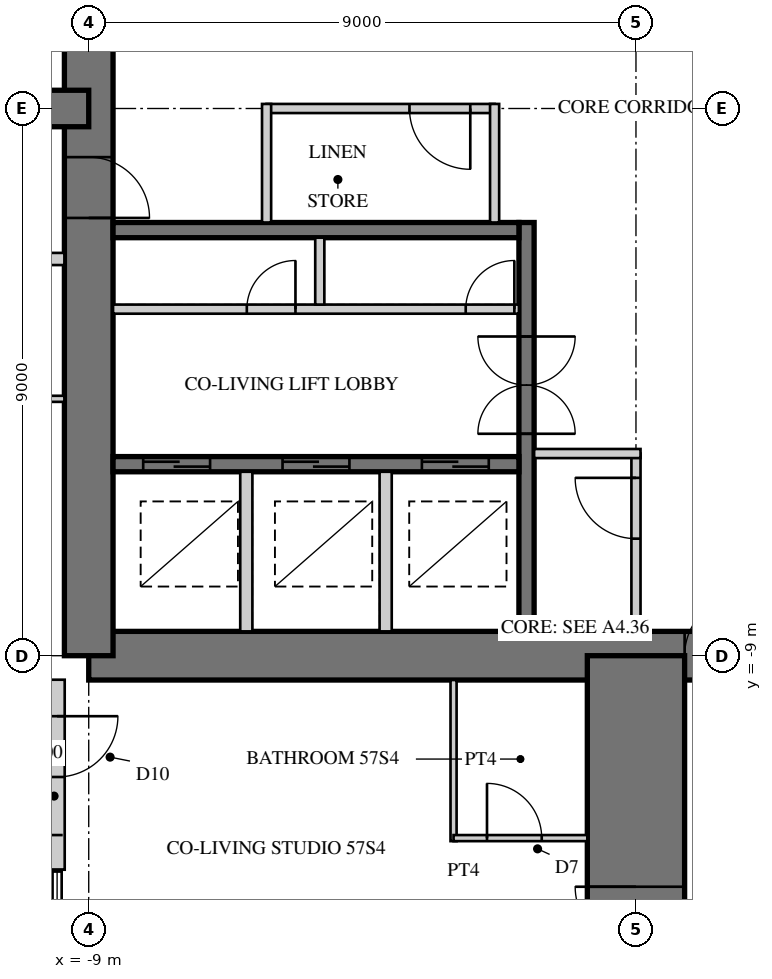
"""IFC4 building model, lengths in metres.
Left out: names, types, materials, properties, quantities, classifications, styles, units other than length and angle.
Written with IfcOpenShell. Run it as: python <this file> out.ifc"""

import sys

from ifc_helpers import new_model, si_unit, direction, frame, frame_2d, origin, place, context, subcontext, project, spatial, rectangle, hollow_rectangle, extrude, element, fill, save


model = new_model("IFC4")
c1 = context("Model", 3, precision=1e-05, world=origin(), true_north=direction((0.0, 1.0)))
c2 = subcontext(c1, "Body", "Model", "MODEL_VIEW")
j1 = project(units=[si_unit("LENGTHUNIT", "METRE"), si_unit("PLANEANGLEUNIT", "RADIAN")], contexts=[c1])
p1 = place(None, origin())
s1 = spatial("IfcSite", under=j1, at=p1, CompositionType="ELEMENT")
p2 = place(p1, origin())
s2 = spatial("IfcBuilding", under=s1, at=p2, CompositionType="ELEMENT")
p3 = place(p2, frame((0.0, 0.0, 225.5)))
s3 = spatial("IfcBuildingStorey", under=s2, at=p3, CompositionType="ELEMENT", Elevation=225.5)
p4 = place(p3, frame((-9.0, -9.0, 0.0), z_axis=(0.0, 0.0, 1.0), x_axis=(1.0, 0.0, 0.0)))
e1 = element("IfcWall", 1, at=p4, inside=s3, PredefinedType="SHEAR", context=c2, shape_type="SweptSolid", body=[
    extrude(rectangle(XDim=18.0, YDim=0.8, at=frame_2d((9.0, 0.0))), origin(), (0.0, 0.0, 1.0), 3.4),
])
p5 = place(p4, frame((9.8, 0.0, 0.0)))
e2 = element("IfcOpeningElement", 2, at=p5, cuts=e1, PredefinedType="OPENING", context=c2, shape_type="SweptSolid", body=[
    extrude(rectangle(XDim=1.0, YDim=2.4, at=frame_2d((0.5, 1.2))), frame((0.0, 0.41, 0.0), z_axis=(0.0, -1.0, 0.0), x_axis=(1.0, 0.0, 0.0)), (0.0, 0.0, 1.0), 0.82),
])
p6 = place(p3, frame((-9.0, 9.0, 0.0), z_axis=(0.0, 0.0, 1.0), x_axis=(0.0, -1.0, 0.0)))
e3 = element("IfcWall", 3, at=p6, inside=s3, PredefinedType="SHEAR", context=c2, shape_type="SweptSolid", body=[
    extrude(rectangle(XDim=18.0, YDim=0.8, at=frame_2d((9.0, 0.0))), origin(), (0.0, 0.0, 1.0), 3.4),
])
p7 = place(p6, frame((9.8, 0.0, 0.0)))
e4 = element("IfcOpeningElement", 4, at=p7, cuts=e3, PredefinedType="OPENING", context=c2, shape_type="SweptSolid", body=[
    extrude(rectangle(XDim=1.0, YDim=2.4, at=frame_2d((0.5, 1.2))), frame((0.0, 0.41, 0.0), z_axis=(0.0, -1.0, 0.0), x_axis=(1.0, 0.0, 0.0)), (0.0, 0.0, 1.0), 0.82),
])
p8 = place(p3, frame((-1.8, -1.875, 0.0), z_axis=(0.0, 0.0, 1.0), x_axis=(0.0, -1.0, 0.0)))
e5 = element("IfcWall", 5, at=p8, inside=s3, PredefinedType="SHEAR", context=c2, shape_type="SweptSolid", body=[
    extrude(rectangle(XDim=6.725, YDim=0.25, at=frame_2d((3.363, 0.0))), origin(), (0.0, 0.0, 1.0), 3.4),
])
p9 = place(p8, frame((1.875, 0.0, 0.0)))
e6 = element("IfcOpeningElement", 6, at=p9, cuts=e5, PredefinedType="OPENING", context=c2, shape_type="SweptSolid", body=[
    extrude(rectangle(XDim=1.6, YDim=2.4, at=frame_2d((0.8, 1.2))), frame((0.0, 0.135, 0.0), z_axis=(0.0, -1.0, 0.0), x_axis=(1.0, 0.0, 0.0)), (0.0, 0.0, 1.0), 0.27),
])
p10 = place(p3, frame((-1.925, -2.0, 0.0), z_axis=(0.0, 0.0, 1.0), x_axis=(-1.0, 0.0, 0.0)))
e7 = element("IfcWall", 7, at=p10, inside=s3, PredefinedType="SHEAR", context=c2, shape_type="SweptSolid", body=[
    extrude(rectangle(XDim=6.675, YDim=0.25, at=frame_2d((3.337, 0.0))), origin(), (0.0, 0.0, 1.0), 3.4),
])
p11 = place(p3, frame((-1.925, -5.85, 0.0), z_axis=(0.0, 0.0, 1.0), x_axis=(-1.0, 0.0, 0.0)))
e8 = element("IfcWall", 8, at=p11, inside=s3, PredefinedType="SHEAR", context=c2, shape_type="SweptSolid", body=[
    extrude(rectangle(XDim=6.675, YDim=0.25, at=frame_2d((3.337, 0.0))), origin(), (0.0, 0.0, 1.0), 3.4),
])
p12 = place(p11, frame((0.496, 0.0, 0.0)))
e9 = element("IfcOpeningElement", 9, at=p12, cuts=e8, PredefinedType="OPENING", context=c2, shape_type="SweptSolid", body=[
    extrude(rectangle(XDim=1.1, YDim=2.2, at=frame_2d((0.55, 1.1))), frame((0.0, 0.135, 0.0), z_axis=(0.0, -1.0, 0.0), x_axis=(1.0, 0.0, 0.0)), (0.0, 0.0, 1.0), 0.27),
])
p13 = place(p11, frame((2.788, 0.0, 0.0)))
e10 = element("IfcOpeningElement", 10, at=p13, cuts=e8, PredefinedType="OPENING", context=c2, shape_type="SweptSolid", body=[
    extrude(rectangle(XDim=1.1, YDim=2.2, at=frame_2d((0.55, 1.1))), frame((0.0, 0.135, 0.0), z_axis=(0.0, -1.0, 0.0), x_axis=(1.0, 0.0, 0.0)), (0.0, 0.0, 1.0), 0.27),
])
p14 = place(p11, frame((5.079, 0.0, 0.0)))
e11 = element("IfcOpeningElement", 11, at=p14, cuts=e8, PredefinedType="OPENING", context=c2, shape_type="SweptSolid", body=[
    extrude(rectangle(XDim=1.1, YDim=2.2, at=frame_2d((0.55, 1.1))), frame((0.0, 0.135, 0.0), z_axis=(0.0, -1.0, 0.0), x_axis=(1.0, 0.0, 0.0)), (0.0, 0.0, 1.0), 0.27),
])
p15 = place(p3, frame((-1.925, -3.3, 0.0), z_axis=(0.0, 0.0, 1.0), x_axis=(-1.0, 0.0, 0.0)))
e12 = element("IfcWall", 12, at=p15, inside=s3, PredefinedType="PARTITIONING", context=c2, shape_type="SweptSolid", body=[
    extrude(rectangle(XDim=6.675, YDim=0.15, at=frame_2d((3.337, 0.0))), origin(), (0.0, 0.0, 1.0), 3.4),
])
p16 = place(p15, frame((0.075, 0.0, 0.0)))
e13 = element("IfcOpeningElement", 13, at=p16, cuts=e12, PredefinedType="OPENING", context=c2, shape_type="SweptSolid", body=[
    extrude(rectangle(XDim=0.8, YDim=2.1, at=frame_2d((0.4, 1.05))), frame((0.0, 0.085, 0.0), z_axis=(0.0, -1.0, 0.0), x_axis=(1.0, 0.0, 0.0)), (0.0, 0.0, 1.0), 0.17),
])
p17 = place(p15, frame((3.675, 0.0, 0.0)))
e14 = element("IfcOpeningElement", 14, at=p17, cuts=e12, PredefinedType="OPENING", context=c2, shape_type="SweptSolid", body=[
    extrude(rectangle(XDim=0.8, YDim=2.1, at=frame_2d((0.4, 1.05))), frame((0.0, 0.085, 0.0), z_axis=(0.0, -1.0, 0.0), x_axis=(1.0, 0.0, 0.0)), (0.0, 0.0, 1.0), 0.17),
])
p18 = place(p3, frame((-5.2, -2.125, 0.0), z_axis=(0.0, 0.0, 1.0), x_axis=(0.0, -1.0, 0.0)))
e15 = element("IfcWall", 15, at=p18, inside=s3, PredefinedType="PARTITIONING", context=c2, shape_type="SweptSolid", body=[
    extrude(rectangle(XDim=1.1, YDim=0.15, at=frame_2d((0.55, 0.0))), origin(), (0.0, 0.0, 1.0), 3.4),
])
for number, where, z_axis, x_axis in (
    (16, (-4.117, -5.975, 0.0), (0.0, 0.0, 1.0), (0.0, -1.0, 0.0)),
    (17, (-6.408, -5.975, 0.0), (0.0, 0.0, 1.0), (0.0, -1.0, 0.0)),
):
    element("IfcWall", number, at=place(p3, frame(where, z_axis=z_axis, x_axis=x_axis)), inside=s3, PredefinedType="PARTITIONING", context=c2, shape_type="SweptSolid", body=[
        extrude(rectangle(XDim=2.625, YDim=0.2, at=frame_2d((1.312, 0.0))), origin(), (0.0, 0.0, 1.0), 3.4),
    ])
p19 = place(p3, frame((0.0, -9.0, 0.0), z_axis=(0.0, 0.0, 1.0), x_axis=(0.0, -1.0, 0.0)))
e18 = element("IfcWall", 18, at=p19, inside=s3, PredefinedType="SHEAR", context=c2, shape_type="SweptSolid", body=[
    extrude(rectangle(XDim=9.0, YDim=1.6, at=frame_2d((4.5, 0.0))), origin(), (0.0, 0.0, 1.0), 3.4),
])
p20 = place(p19, frame((3.8, 0.0, 0.0)))
e19 = element("IfcOpeningElement", 19, at=p20, cuts=e18, PredefinedType="OPENING", context=c2, shape_type="SweptSolid", body=[
    extrude(rectangle(XDim=1.0, YDim=2.15, at=frame_2d((0.5, 1.075))), frame((0.0, 0.81, 0.0), z_axis=(0.0, -1.0, 0.0), x_axis=(1.0, 0.0, 0.0)), (0.0, 0.0, 1.0), 1.62),
])
p21 = place(p19, frame((7.0, 0.0, 0.0)))
e20 = element("IfcOpeningElement", 20, at=p21, cuts=e18, PredefinedType="OPENING", context=c2, shape_type="SweptSolid", body=[
    extrude(rectangle(XDim=1.0, YDim=2.2, at=frame_2d((0.5, 1.1))), frame((0.0, 0.81, 0.0), z_axis=(0.0, -1.0, 0.0), x_axis=(1.0, 0.0, 0.0)), (0.0, 0.0, 1.0), 1.62),
])
p22 = place(p3, frame((-9.0, 0.0, 0.0), z_axis=(0.0, 0.0, 1.0), x_axis=(-1.0, 0.0, 0.0)))
e21 = element("IfcWall", 21, at=p22, inside=s3, PredefinedType="SHEAR", context=c2, shape_type="SweptSolid", body=[
    extrude(rectangle(XDim=18.0, YDim=0.6, at=frame_2d((9.0, 0.0))), origin(), (0.0, 0.0, 1.0), 3.4),
])
p23 = place(p22, frame((3.8, 0.0, 0.0)))
e22 = element("IfcOpeningElement", 22, at=p23, cuts=e21, PredefinedType="OPENING", context=c2, shape_type="SweptSolid", body=[
    extrude(rectangle(XDim=1.0, YDim=2.15, at=frame_2d((0.5, 1.075))), frame((0.0, 0.31, 0.0), z_axis=(0.0, -1.0, 0.0), x_axis=(1.0, 0.0, 0.0)), (0.0, 0.0, 1.0), 0.62),
])
p24 = place(p22, frame((6.6, 0.0, 0.0)))
e23 = element("IfcOpeningElement", 23, at=p24, cuts=e21, PredefinedType="OPENING", context=c2, shape_type="SweptSolid", body=[
    extrude(rectangle(XDim=1.0, YDim=2.15, at=frame_2d((0.5, 1.075))), frame((0.0, 0.31, 0.0), z_axis=(0.0, -1.0, 0.0), x_axis=(1.0, 0.0, 0.0)), (0.0, 0.0, 1.0), 0.62),
])
p25 = place(p22, frame((13.3, 0.0, 0.0)))
e24 = element("IfcOpeningElement", 24, at=p25, cuts=e21, PredefinedType="OPENING", context=c2, shape_type="SweptSolid", body=[
    extrude(rectangle(XDim=1.0, YDim=2.2, at=frame_2d((0.5, 1.1))), frame((0.0, 0.31, 0.0), z_axis=(0.0, -1.0, 0.0), x_axis=(1.0, 0.0, 0.0)), (0.0, 0.0, 1.0), 0.62),
])
p26 = place(p3, frame((-9.52, -9.395, 0.0), z_axis=(0.0, 0.0, 1.0), x_axis=(0.0, -1.0, 0.0)))
e25 = element("IfcWall", 25, at=p26, inside=s3, PredefinedType="SOLIDWALL", context=c2, shape_type="SweptSolid", body=[
    extrude(rectangle(XDim=3.125, YDim=0.25, at=frame_2d((1.562, 0.0))), origin(), (0.0, 0.0, 1.0), 3.22),
])
p27 = place(p26, frame((0.6, 0.0, 0.0)))
e26 = element("IfcOpeningElement", 26, at=p27, cuts=e25, PredefinedType="OPENING", context=c2, shape_type="SweptSolid", body=[
    extrude(rectangle(XDim=1.0, YDim=2.2, at=frame_2d((0.5, 1.1))), frame((0.0, 0.135, 0.0), z_axis=(0.0, -1.0, 0.0), x_axis=(1.0, 0.0, 0.0)), (0.0, 0.0, 1.0), 0.27),
])
p28 = place(p3, frame((-2.325, 0.0, 0.0), z_axis=(0.0, 0.0, 1.0), x_axis=(-1.0, 0.0, 0.0)))
e27 = element("IfcWall", 27, at=p28, inside=s3, PredefinedType="PARTITIONING", context=c2, shape_type="SweptSolid", body=[
    extrude(rectangle(XDim=3.75, YDim=0.15, at=frame_2d((1.875, 0.0))), origin(), (0.0, 0.0, 1.0), 3.22),
])
p29 = place(p28, frame((0.4, 0.0, 0.0)))
e28 = element("IfcOpeningElement", 28, at=p29, cuts=e27, PredefinedType="OPENING", context=c2, shape_type="SweptSolid", body=[
    extrude(rectangle(XDim=1.0, YDim=2.1, at=frame_2d((0.5, 1.05))), frame((0.0, 0.085, 0.0), z_axis=(0.0, -1.0, 0.0), x_axis=(1.0, 0.0, 0.0)), (0.0, 0.0, 1.0), 0.17),
])
for number, where, z_axis, x_axis in (
    (29, (-2.325, -1.875, 0.0), (0.0, 0.0, 1.0), (0.0, 1.0, 0.0)),
    (30, (-6.075, 0.075, 0.0), (0.0, 0.0, 1.0), (0.0, -1.0, 0.0)),
):
    element("IfcWall", number, at=place(p3, frame(where, z_axis=z_axis, x_axis=x_axis)), inside=s3, PredefinedType="PARTITIONING", context=c2, shape_type="SweptSolid", body=[
        extrude(rectangle(XDim=1.95, YDim=0.15, at=frame_2d((0.975, 0.0))), origin(), (0.0, 0.0, 1.0), 3.22),
    ])
p30 = place(p3, frame((0.0, -5.675, 0.0), z_axis=(0.0, 0.0, 1.0), x_axis=(0.0, -1.0, 0.0)))
e31 = element("IfcWall", 31, at=p30, inside=s3, PredefinedType="PARTITIONING", context=c2, shape_type="SweptSolid", body=[
    extrude(rectangle(XDim=2.925, YDim=0.15, at=frame_2d((1.462, 0.0))), origin(), (0.0, 0.0, 1.0), 3.22),
])
p31 = place(p30, frame((0.4, 0.0, 0.0)))
e32 = element("IfcOpeningElement", 32, at=p31, cuts=e31, PredefinedType="OPENING", context=c2, shape_type="SweptSolid", body=[
    extrude(rectangle(XDim=1.0, YDim=2.1, at=frame_2d((0.5, 1.05))), frame((0.0, 0.085, 0.0), z_axis=(0.0, -1.0, 0.0), x_axis=(1.0, 0.0, 0.0)), (0.0, 0.0, 1.0), 0.17),
])
p32 = place(p3, frame((-1.675, -5.675, 0.0), z_axis=(0.0, 0.0, 1.0), x_axis=(1.0, 0.0, 0.0)))
e33 = element("IfcWall", 33, at=p32, inside=s3, PredefinedType="PARTITIONING", context=c2, shape_type="SweptSolid", body=[
    extrude(rectangle(XDim=1.75, YDim=0.15, at=frame_2d((0.875, 0.0))), origin(), (0.0, 0.0, 1.0), 3.22),
])
p33 = place(p3, frame((-3.0, -9.4, 0.0), z_axis=(0.0, 0.0, 1.0), x_axis=(0.0, -1.0, 0.0)))
e34 = element("IfcWall", 34, at=p33, inside=s3, PredefinedType="PARTITIONING", context=c2, shape_type="SweptSolid", body=[
    extrude(rectangle(XDim=2.65, YDim=0.1, at=frame_2d((1.325, 0.0))), origin(), (0.0, 0.0, 1.0), 3.22),
])
p34 = place(p3, frame((-3.0, -12.0, 0.0), z_axis=(0.0, 0.0, 1.0), x_axis=(1.0, 0.0, 0.0)))
e35 = element("IfcWall", 35, at=p34, inside=s3, PredefinedType="PARTITIONING", context=c2, shape_type="SweptSolid", body=[
    extrude(rectangle(XDim=2.2, YDim=0.1, at=frame_2d((1.1, 0.0))), origin(), (0.0, 0.0, 1.0), 3.22),
])
p35 = place(p34, frame((0.55, 0.0, 0.0)))
e36 = element("IfcOpeningElement", 36, at=p35, cuts=e35, PredefinedType="OPENING", context=c2, shape_type="SweptSolid", body=[
    extrude(rectangle(XDim=0.9, YDim=2.1, at=frame_2d((0.45, 1.05))), frame((0.0, 0.06, 0.0), z_axis=(0.0, -1.0, 0.0), x_axis=(1.0, 0.0, 0.0)), (0.0, 0.0, 1.0), 0.12),
])
p36 = place(p3, frame((-9.4, -4.775, 0.0), z_axis=(0.0, 0.0, 1.0), x_axis=(-1.0, 0.0, 0.0)))
e37 = element("IfcWall", 37, at=p36, inside=s3, PredefinedType="PARTITIONING", context=c2, shape_type="SweptSolid", body=[
    extrude(rectangle(XDim=2.65, YDim=0.1, at=frame_2d((1.325, 0.0))), origin(), (0.0, 0.0, 1.0), 3.22),
])
p37 = place(p3, frame((-9.4, -2.475, 0.0), z_axis=(0.0, 0.0, 1.0), x_axis=(-1.0, 0.0, 0.0)))
e38 = element("IfcWall", 38, at=p37, inside=s3, PredefinedType="SOLIDWALL", context=c2, shape_type="SweptSolid", body=[
    extrude(rectangle(XDim=11.6, YDim=0.2, at=frame_2d((5.8, 0.0))), origin(), (0.0, 0.0, 1.0), 3.22),
])
p38 = place(p37, frame((3.4, 0.0, 0.0)))
e39 = element("IfcOpeningElement", 39, at=p38, cuts=e38, PredefinedType="OPENING", context=c2, shape_type="SweptSolid", body=[
    extrude(rectangle(XDim=1.0, YDim=2.15, at=frame_2d((0.5, 1.075))), frame((0.0, 0.11, 0.0), z_axis=(0.0, -1.0, 0.0), x_axis=(1.0, 0.0, 0.0)), (0.0, 0.0, 1.0), 0.22),
])
p39 = place(p37, frame((6.2, 0.0, 0.0)))
e40 = element("IfcOpeningElement", 40, at=p39, cuts=e38, PredefinedType="OPENING", context=c2, shape_type="SweptSolid", body=[
    extrude(rectangle(XDim=1.0, YDim=2.15, at=frame_2d((0.5, 1.075))), frame((0.0, 0.11, 0.0), z_axis=(0.0, -1.0, 0.0), x_axis=(1.0, 0.0, 0.0)), (0.0, 0.0, 1.0), 0.22),
])
p40 = place(p27, origin())
e41 = element("IfcDoor", 41, at=p40, inside=s3, OperationType="SINGLE_SWING_LEFT", PredefinedType="DOOR", context=c2, shape_type="SweptSolid", body=[
    extrude(hollow_rectangle(XDim=1.0, YDim=2.2, WallThickness=0.06, at=frame_2d((0.5, 1.1))), frame((0.0, 0.025, 0.0), z_axis=(0.0, -1.0, 0.0), x_axis=(1.0, 0.0, 0.0)), (0.0, 0.0, 1.0), 0.05),
    extrude(rectangle(XDim=0.879, YDim=2.079, at=frame_2d((0.5, 1.1))), frame((0.0, 0.025, 0.0), z_axis=(0.0, -1.0, 0.0), x_axis=(1.0, 0.0, 0.0)), (0.0, 0.0, 1.0), 0.05),
])
fill(e26, e41)
p41 = place(p29, origin())
e42 = element("IfcDoor", 42, at=p41, inside=s3, OperationType="SINGLE_SWING_LEFT", PredefinedType="DOOR", context=c2, shape_type="SweptSolid", body=[
    extrude(rectangle(XDim=1.0, YDim=2.1, at=frame_2d((0.5, 1.05))), frame((0.0, 0.025, 0.0), z_axis=(0.0, -1.0, 0.0), x_axis=(1.0, 0.0, 0.0)), (0.0, 0.0, 1.0), 0.05),
])
fill(e28, e42)
p42 = place(p31, frame((1.0, 0.0, 0.0), z_axis=(0.0, 0.0, 1.0), x_axis=(-1.0, 0.0, 0.0)))
e43 = element("IfcDoor", 43, at=p42, inside=s3, OperationType="SINGLE_SWING_RIGHT", PredefinedType="DOOR", context=c2, shape_type="SweptSolid", body=[
    extrude(rectangle(XDim=1.0, YDim=2.1, at=frame_2d((0.5, 1.05))), frame((0.0, 0.025, 0.0), z_axis=(0.0, -1.0, 0.0), x_axis=(1.0, 0.0, 0.0)), (0.0, 0.0, 1.0), 0.05),
])
fill(e32, e43)
p43 = place(p35, origin())
e44 = element("IfcDoor", 44, at=p43, inside=s3, OperationType="SINGLE_SWING_LEFT", PredefinedType="DOOR", context=c2, shape_type="SweptSolid", body=[
    extrude(rectangle(XDim=0.9, YDim=2.1, at=frame_2d((0.45, 1.05))), frame((0.0, 0.025, 0.0), z_axis=(0.0, -1.0, 0.0), x_axis=(1.0, 0.0, 0.0)), (0.0, 0.0, 1.0), 0.05),
])
fill(e36, e44)
p44 = place(p20, frame((1.0, 0.0, 0.0), z_axis=(0.0, 0.0, 1.0), x_axis=(-1.0, 0.0, 0.0)))
e45 = element("IfcDoor", 45, at=p44, inside=s3, OperationType="SINGLE_SWING_RIGHT", PredefinedType="DOOR", context=c2, shape_type="SweptSolid", body=[
    extrude(rectangle(XDim=1.0, YDim=2.15, at=frame_2d((0.5, 1.075))), frame((0.0, 0.025, 0.0), z_axis=(0.0, -1.0, 0.0), x_axis=(1.0, 0.0, 0.0)), (0.0, 0.0, 1.0), 0.05),
])
fill(e19, e45)
p45 = place(p5, origin())
e46 = element("IfcDoor", 46, at=p45, inside=s3, OperationType="SINGLE_SWING_RIGHT", PredefinedType="DOOR", context=c2, shape_type="SweptSolid", body=[
    extrude(rectangle(XDim=1.0, YDim=2.4, at=frame_2d((0.5, 1.2))), frame((0.0, 0.055, 0.0), z_axis=(0.0, -1.0, 0.0), x_axis=(1.0, 0.0, 0.0)), (0.0, 0.0, 1.0), 0.05),
])
fill(e2, e46)
p46 = place(p7, origin())
e47 = element("IfcDoor", 47, at=p46, inside=s3, OperationType="SINGLE_SWING_RIGHT", PredefinedType="DOOR", context=c2, shape_type="SweptSolid", body=[
    extrude(rectangle(XDim=1.0, YDim=2.4, at=frame_2d((0.5, 1.2))), frame((0.0, 0.055, 0.0), z_axis=(0.0, -1.0, 0.0), x_axis=(1.0, 0.0, 0.0)), (0.0, 0.0, 1.0), 0.05),
])
fill(e4, e47)
p47 = place(p12, origin())
e48 = element("IfcDoor", 48, at=p47, inside=s3, OperationType="DOUBLE_DOOR_SLIDING", PredefinedType="DOOR", context=c2, shape_type="SweptSolid", body=[
    extrude(rectangle(XDim=1.1, YDim=2.2, at=frame_2d((0.55, 1.1))), frame((0.0, 0.025, 0.0), z_axis=(0.0, -1.0, 0.0), x_axis=(1.0, 0.0, 0.0)), (0.0, 0.0, 1.0), 0.05),
])
fill(e9, e48)
p48 = place(p13, origin())
e49 = element("IfcDoor", 49, at=p48, inside=s3, OperationType="DOUBLE_DOOR_SLIDING", PredefinedType="DOOR", context=c2, shape_type="SweptSolid", body=[
    extrude(rectangle(XDim=1.1, YDim=2.2, at=frame_2d((0.55, 1.1))), frame((0.0, 0.025, 0.0), z_axis=(0.0, -1.0, 0.0), x_axis=(1.0, 0.0, 0.0)), (0.0, 0.0, 1.0), 0.05),
])
fill(e10, e49)
p49 = place(p14, origin())
e50 = element("IfcDoor", 50, at=p49, inside=s3, OperationType="DOUBLE_DOOR_SLIDING", PredefinedType="DOOR", context=c2, shape_type="SweptSolid", body=[
    extrude(rectangle(XDim=1.1, YDim=2.2, at=frame_2d((0.55, 1.1))), frame((0.0, 0.025, 0.0), z_axis=(0.0, -1.0, 0.0), x_axis=(1.0, 0.0, 0.0)), (0.0, 0.0, 1.0), 0.05),
])
fill(e11, e50)
p50 = place(p9, origin())
e51 = element("IfcDoor", 51, at=p50, inside=s3, OperationType="DOUBLE_DOOR_DOUBLE_SWING", PredefinedType="DOOR", context=c2, shape_type="SweptSolid", body=[
    extrude(rectangle(XDim=1.6, YDim=2.4, at=frame_2d((0.8, 1.2))), frame((0.0, 0.025, 0.0), z_axis=(0.0, -1.0, 0.0), x_axis=(1.0, 0.0, 0.0)), (0.0, 0.0, 1.0), 0.05),
])
fill(e6, e51)
p51 = place(p16, frame((0.8, 0.0, 0.0), z_axis=(0.0, 0.0, 1.0), x_axis=(-1.0, 0.0, 0.0)))
e52 = element("IfcDoor", 52, at=p51, inside=s3, OperationType="SINGLE_SWING_RIGHT", PredefinedType="DOOR", context=c2, shape_type="SweptSolid", body=[
    extrude(rectangle(XDim=0.8, YDim=2.1, at=frame_2d((0.4, 1.05))), frame((0.0, 0.025, 0.0), z_axis=(0.0, -1.0, 0.0), x_axis=(1.0, 0.0, 0.0)), (0.0, 0.0, 1.0), 0.05),
])
fill(e13, e52)
p52 = place(p17, frame((0.8, 0.0, 0.0), z_axis=(0.0, 0.0, 1.0), x_axis=(-1.0, 0.0, 0.0)))
e53 = element("IfcDoor", 53, at=p52, inside=s3, OperationType="SINGLE_SWING_RIGHT", PredefinedType="DOOR", context=c2, shape_type="SweptSolid", body=[
    extrude(rectangle(XDim=0.8, YDim=2.1, at=frame_2d((0.4, 1.05))), frame((0.0, 0.025, 0.0), z_axis=(0.0, -1.0, 0.0), x_axis=(1.0, 0.0, 0.0)), (0.0, 0.0, 1.0), 0.05),
])
fill(e14, e53)
save(model, sys.argv[1])
